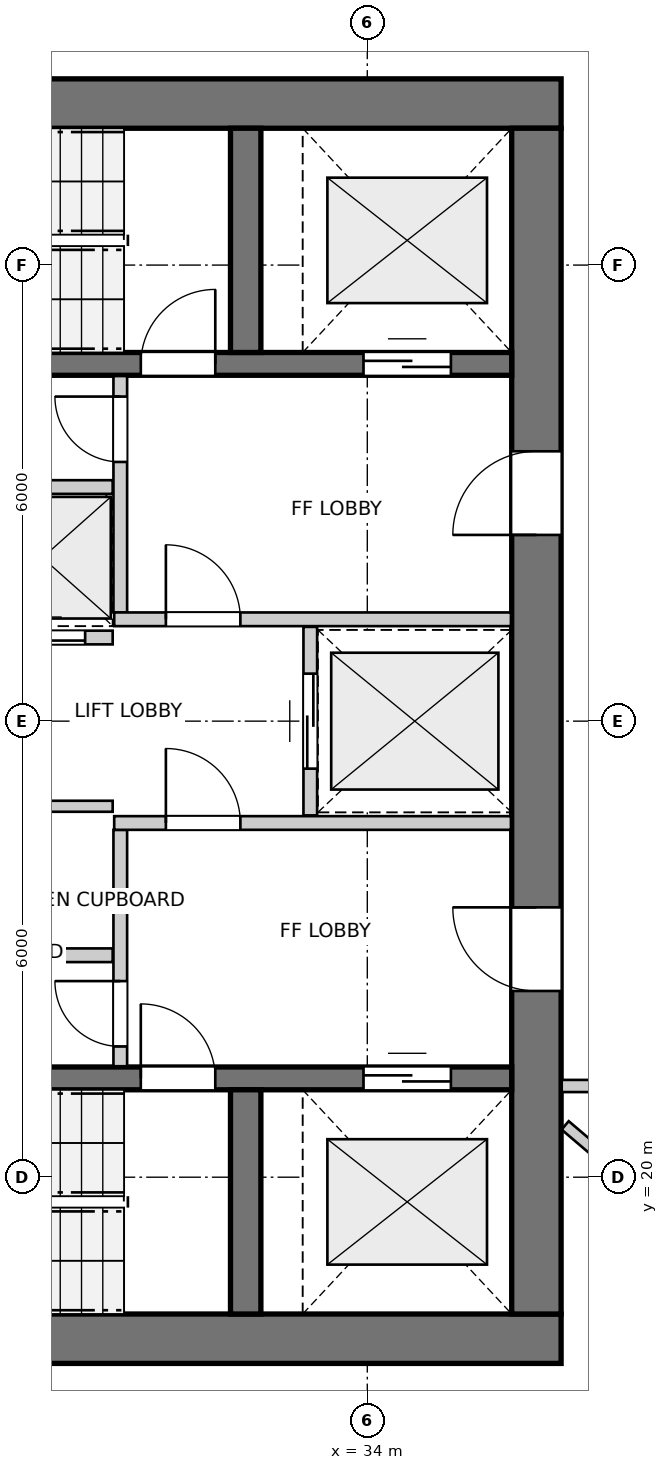
"""IFC4 building model, lengths in metres.
Left out: names, types, materials, properties, quantities, classifications, styles, units other than length and angle.
Written with IfcOpenShell. Run it as: python <this file> out.ifc"""

import sys

from ifc_helpers import new_model, si_unit, direction, frame, frame_2d, origin, place, context, subcontext, project, spatial, rectangle, extrude, source, transform, mapped, element, fill, save


model = new_model("IFC4")
c1 = context("Model", 3, precision=1e-05, world=origin(), true_north=direction((0.0, 1.0)))
c2 = subcontext(c1, "Body", "Model", "MODEL_VIEW")
j1 = project(units=[si_unit("LENGTHUNIT", "METRE"), si_unit("PLANEANGLEUNIT", "RADIAN")], contexts=[c1])
p1 = place(None, origin())
s1 = spatial("IfcSite", under=j1, at=p1, CompositionType="ELEMENT")
p2 = place(p1, origin())
s2 = spatial("IfcBuilding", under=s1, at=p2, CompositionType="ELEMENT")
p3 = place(p2, frame((0.0, 0.0, 165.0)))
s3 = spatial("IfcBuildingStorey", under=s2, at=p3, CompositionType="ELEMENT", Elevation=165.0)
for number, where, z_axis, x_axis in (
    (1, (24.15, 17.875, 0.0), (0.0, 0.0, 1.0), (1.0, 0.0, 0.0)),
    (2, (36.55, 34.125, 0.0), (0.0, 0.0, 1.0), (-1.0, 0.0, 0.0)),
):
    element("IfcWall", number, at=place(p3, frame(where, z_axis=z_axis, x_axis=x_axis)), inside=s3, PredefinedType="SHEAR", context=c2, shape_type="SweptSolid", body=[
        extrude(rectangle(XDim=12.4, YDim=0.65, at=frame_2d((6.2, 0.0))), origin(), (0.0, 0.0, 1.0), 2.95),
    ])
p4 = place(p3, frame((36.225, 18.2, 0.0), z_axis=(0.0, 0.0, 1.0), x_axis=(0.0, 1.0, 0.0)))
e3 = element("IfcWall", 3, at=p4, inside=s3, PredefinedType="SHEAR", context=c2, shape_type="SweptSolid", body=[
    extrude(rectangle(XDim=15.6, YDim=0.65, at=frame_2d((7.8, 0.0))), origin(), (0.0, 0.0, 1.0), 2.95),
])
p5 = place(p4, frame((4.25, 0.0, 0.0)))
e4 = element("IfcOpeningElement", 4, at=p5, cuts=e3, PredefinedType="OPENING", context=c2, shape_type="SweptSolid", body=[
    extrude(rectangle(XDim=1.1, YDim=2.15, at=frame_2d((0.55, 1.075))), frame((0.0, 0.335, 0.0), z_axis=(0.0, -1.0, 0.0), x_axis=(1.0, 0.0, 0.0)), (0.0, 0.0, 1.0), 0.67),
])
p6 = place(p4, frame((10.25, 0.0, 0.0)))
e5 = element("IfcOpeningElement", 5, at=p6, cuts=e3, PredefinedType="OPENING", context=c2, shape_type="SweptSolid", body=[
    extrude(rectangle(XDim=1.1, YDim=2.15, at=frame_2d((0.55, 1.075))), frame((0.0, 0.335, 0.0), z_axis=(0.0, -1.0, 0.0), x_axis=(1.0, 0.0, 0.0)), (0.0, 0.0, 1.0), 0.67),
])
p7 = place(p3, frame((24.8, 21.3, 0.0), z_axis=(0.0, 0.0, 1.0), x_axis=(1.0, 0.0, 0.0)))
e6 = element("IfcWall", 6, at=p7, inside=s3, PredefinedType="SHEAR", context=c2, shape_type="SweptSolid", body=[
    extrude(rectangle(XDim=11.1, YDim=0.3, at=frame_2d((5.55, 0.0))), origin(), (0.0, 0.0, 1.0), 2.95),
])
p8 = place(p7, frame((6.22, 0.0, 0.0)))
e7 = element("IfcOpeningElement", 7, at=p8, cuts=e6, PredefinedType="OPENING", context=c2, shape_type="SweptSolid", body=[
    extrude(rectangle(XDim=0.98, YDim=2.15, at=frame_2d((0.49, 1.075))), frame((0.0, 0.16, 0.0), z_axis=(0.0, -1.0, 0.0), x_axis=(1.0, 0.0, 0.0)), (0.0, 0.0, 1.0), 0.32),
])
p9 = place(p7, frame((9.15, 0.0, 0.0)))
e8 = element("IfcOpeningElement", 8, at=p9, cuts=e6, PredefinedType="OPENING", context=c2, shape_type="SweptSolid", body=[
    extrude(rectangle(XDim=1.15, YDim=2.15, at=frame_2d((0.575, 1.075))), frame((0.0, 0.16, 0.0), z_axis=(0.0, -1.0, 0.0), x_axis=(1.0, 0.0, 0.0)), (0.0, 0.0, 1.0), 0.32),
])
p10 = place(p3, frame((32.4, 18.2, 0.0), z_axis=(0.0, 0.0, 1.0), x_axis=(0.0, 1.0, 0.0)))
e9 = element("IfcWall", 9, at=p10, inside=s3, PredefinedType="SHEAR", context=c2, shape_type="SweptSolid", body=[
    extrude(rectangle(XDim=2.95, YDim=0.4, at=frame_2d((1.475, 0.0))), origin(), (0.0, 0.0, 1.0), 2.95),
])
p11 = place(p3, frame((24.8, 30.7, 0.0), z_axis=(0.0, 0.0, 1.0), x_axis=(1.0, 0.0, 0.0)))
e10 = element("IfcWall", 10, at=p11, inside=s3, PredefinedType="SHEAR", context=c2, shape_type="SweptSolid", body=[
    extrude(rectangle(XDim=11.1, YDim=0.3, at=frame_2d((5.55, 0.0))), origin(), (0.0, 0.0, 1.0), 2.95),
])
p12 = place(p11, frame((6.22, 0.0, 0.0)))
e11 = element("IfcOpeningElement", 11, at=p12, cuts=e10, PredefinedType="OPENING", context=c2, shape_type="SweptSolid", body=[
    extrude(rectangle(XDim=0.98, YDim=2.15, at=frame_2d((0.49, 1.075))), frame((0.0, 0.16, 0.0), z_axis=(0.0, -1.0, 0.0), x_axis=(1.0, 0.0, 0.0)), (0.0, 0.0, 1.0), 0.32),
])
p13 = place(p11, frame((9.15, 0.0, 0.0)))
e12 = element("IfcOpeningElement", 12, at=p13, cuts=e10, PredefinedType="OPENING", context=c2, shape_type="SweptSolid", body=[
    extrude(rectangle(XDim=1.15, YDim=2.15, at=frame_2d((0.575, 1.075))), frame((0.0, 0.16, 0.0), z_axis=(0.0, -1.0, 0.0), x_axis=(1.0, 0.0, 0.0)), (0.0, 0.0, 1.0), 0.32),
])
p14 = place(p3, frame((32.4, 30.85, 0.0), z_axis=(0.0, 0.0, 1.0), x_axis=(0.0, 1.0, 0.0)))
e13 = element("IfcWall", 13, at=p14, inside=s3, PredefinedType="SHEAR", context=c2, shape_type="SweptSolid", body=[
    extrude(rectangle(XDim=2.95, YDim=0.4, at=frame_2d((1.475, 0.0))), origin(), (0.0, 0.0, 1.0), 2.95),
])
p15 = place(p3, frame((30.75, 21.46, 0.0), z_axis=(0.0, 0.0, 1.0), x_axis=(0.0, 1.0, 0.0)))
e14 = element("IfcWall", 14, at=p15, inside=s3, PredefinedType="PARTITIONING", context=c2, shape_type="SweptSolid", body=[
    extrude(rectangle(XDim=3.11, YDim=0.18, at=frame_2d((1.555, 0.0))), origin(), (0.0, 0.0, 1.0), 2.95),
])
p16 = place(p15, frame((0.26, 0.0, 0.0)))
e15 = element("IfcOpeningElement", 15, at=p16, cuts=e14, PredefinedType="OPENING", context=c2, shape_type="SweptSolid", body=[
    extrude(rectangle(XDim=0.86, YDim=2.05, at=frame_2d((0.43, 1.025))), frame((0.0, 0.1, 0.0), z_axis=(0.0, -1.0, 0.0), x_axis=(1.0, 0.0, 0.0)), (0.0, 0.0, 1.0), 0.2),
])
p17 = place(p3, frame((30.67, 24.66, 0.0), z_axis=(0.0, 0.0, 1.0), x_axis=(1.0, 0.0, 0.0)))
e16 = element("IfcWall", 16, at=p17, inside=s3, PredefinedType="PARTITIONING", context=c2, shape_type="SweptSolid", body=[
    extrude(rectangle(XDim=5.22, YDim=0.18, at=frame_2d((2.61, 0.0))), origin(), (0.0, 0.0, 1.0), 2.95),
])
p18 = place(p17, frame((0.68, 0.0, 0.0)))
e17 = element("IfcOpeningElement", 17, at=p18, cuts=e16, PredefinedType="OPENING", context=c2, shape_type="SweptSolid", body=[
    extrude(rectangle(XDim=0.98, YDim=2.15, at=frame_2d((0.49, 1.075))), frame((0.0, 0.1, 0.0), z_axis=(0.0, -1.0, 0.0), x_axis=(1.0, 0.0, 0.0)), (0.0, 0.0, 1.0), 0.2),
])
p19 = place(p3, frame((30.75, 27.43, 0.0), z_axis=(0.0, 0.0, 1.0), x_axis=(0.0, 1.0, 0.0)))
e18 = element("IfcWall", 18, at=p19, inside=s3, PredefinedType="PARTITIONING", context=c2, shape_type="SweptSolid", body=[
    extrude(rectangle(XDim=3.11, YDim=0.18, at=frame_2d((1.555, 0.0))), origin(), (0.0, 0.0, 1.0), 2.95),
])
p20 = place(p19, frame((1.98, 0.0, 0.0)))
e19 = element("IfcOpeningElement", 19, at=p20, cuts=e18, PredefinedType="OPENING", context=c2, shape_type="SweptSolid", body=[
    extrude(rectangle(XDim=0.86, YDim=2.05, at=frame_2d((0.43, 1.025))), frame((0.0, 0.1, 0.0), z_axis=(0.0, -1.0, 0.0), x_axis=(1.0, 0.0, 0.0)), (0.0, 0.0, 1.0), 0.2),
])
p21 = place(p3, frame((30.67, 27.34, 0.0), z_axis=(0.0, 0.0, 1.0), x_axis=(1.0, 0.0, 0.0)))
e20 = element("IfcWall", 20, at=p21, inside=s3, PredefinedType="PARTITIONING", context=c2, shape_type="SweptSolid", body=[
    extrude(rectangle(XDim=5.22, YDim=0.18, at=frame_2d((2.61, 0.0))), origin(), (0.0, 0.0, 1.0), 2.95),
])
p22 = place(p21, frame((0.68, 0.0, 0.0)))
e21 = element("IfcOpeningElement", 21, at=p22, cuts=e20, PredefinedType="OPENING", context=c2, shape_type="SweptSolid", body=[
    extrude(rectangle(XDim=0.98, YDim=2.15, at=frame_2d((0.49, 1.075))), frame((0.0, 0.1, 0.0), z_axis=(0.0, -1.0, 0.0), x_axis=(1.0, 0.0, 0.0)), (0.0, 0.0, 1.0), 0.2),
])
p23 = place(p3, frame((33.25, 24.76, 0.0), z_axis=(0.0, 0.0, 1.0), x_axis=(0.0, 1.0, 0.0)))
e22 = element("IfcWall", 22, at=p23, inside=s3, PredefinedType="PARTITIONING", context=c2, shape_type="SweptSolid", body=[
    extrude(rectangle(XDim=2.48, YDim=0.18, at=frame_2d((1.24, 0.0))), origin(), (0.0, 0.0, 1.0), 2.95),
])
p24 = place(p23, frame((0.615, 0.0, 0.0)))
e23 = element("IfcOpeningElement", 23, at=p24, cuts=e22, PredefinedType="OPENING", context=c2, shape_type="SweptSolid", body=[
    extrude(rectangle(XDim=1.25, YDim=2.15, at=frame_2d((0.625, 1.075))), frame((0.0, 0.1, 0.0), z_axis=(0.0, -1.0, 0.0), x_axis=(1.0, 0.0, 0.0)), (0.0, 0.0, 1.0), 0.2),
])
p25 = place(p3, frame((24.81, 22.92, 0.0), z_axis=(0.0, 0.0, 1.0), x_axis=(1.0, 0.0, 0.0)))
e24 = element("IfcWall", 24, at=p25, inside=s3, PredefinedType="PARTITIONING", context=c2, shape_type="SweptSolid", body=[
    extrude(rectangle(XDim=5.84, YDim=0.18, at=frame_2d((2.92, 0.0))), origin(), (0.0, 0.0, 1.0), 2.95),
])
p26 = place(p3, frame((28.13, 24.88, 0.0), z_axis=(0.0, 0.0, 1.0), x_axis=(1.0, 0.0, 0.0)))
e25 = element("IfcWall", 25, at=p26, inside=s3, PredefinedType="PARTITIONING", context=c2, shape_type="SweptSolid", body=[
    extrude(rectangle(XDim=2.52, YDim=0.145, at=frame_2d((1.26, 0.0))), origin(), (0.0, 0.0, 1.0), 2.95),
])
p27 = place(p26, frame((0.82, 0.0, 0.0)))
e26 = element("IfcOpeningElement", 26, at=p27, cuts=e25, PredefinedType="OPENING", context=c2, shape_type="SweptSolid", body=[
    extrude(rectangle(XDim=0.86, YDim=2.05, at=frame_2d((0.43, 1.025))), frame((0.0, 0.083, 0.0), z_axis=(0.0, -1.0, 0.0), x_axis=(1.0, 0.0, 0.0)), (0.0, 0.0, 1.0), 0.165),
])
p28 = place(p3, frame((24.81, 29.08, 0.0), z_axis=(0.0, 0.0, 1.0), x_axis=(1.0, 0.0, 0.0)))
e27 = element("IfcWall", 27, at=p28, inside=s3, PredefinedType="PARTITIONING", context=c2, shape_type="SweptSolid", body=[
    extrude(rectangle(XDim=5.84, YDim=0.18, at=frame_2d((2.92, 0.0))), origin(), (0.0, 0.0, 1.0), 2.95),
])
p29 = place(p3, frame((28.825, 27.1, 0.0), z_axis=(0.0, 0.0, 1.0), x_axis=(1.0, 0.0, 0.0)))
e28 = element("IfcWall", 28, at=p29, inside=s3, PredefinedType="PARTITIONING", context=c2, shape_type="SweptSolid", body=[
    extrude(rectangle(XDim=1.825, YDim=0.18, at=frame_2d((0.913, 0.0))), origin(), (0.0, 0.0, 1.0), 2.95),
])
p30 = place(p29, frame((0.363, 0.0, 0.0)))
e29 = element("IfcOpeningElement", 29, at=p30, cuts=e28, PredefinedType="OPENING", context=c2, shape_type="SweptSolid", body=[
    extrude(rectangle(XDim=1.1, YDim=2.15, at=frame_2d((0.55, 1.075))), frame((0.0, 0.1, 0.0), z_axis=(0.0, -1.0, 0.0), x_axis=(1.0, 0.0, 0.0)), (0.0, 0.0, 1.0), 0.2),
])
p31 = place(p3, frame((36.603, 20.682, 0.0), z_axis=(0.0, 0.0, 1.0), x_axis=(0.761710074833, -0.647918020971, 0.0)))
e30 = element("IfcWall", 30, at=p31, inside=s3, PredefinedType="PARTITIONING", context=c2, shape_type="SweptSolid", body=[
    extrude(rectangle(XDim=7.359, YDim=0.145, at=frame_2d((3.68, 0.0))), origin(), (0.0, 0.0, 1.0), 2.95),
])
p32 = place(p3, frame((36.558, 21.2, 0.0), z_axis=(0.0, 0.0, 1.0), x_axis=(1.0, 0.0, 0.0)))
e31 = element("IfcWall", 31, at=p32, inside=s3, PredefinedType="PARTITIONING", context=c2, shape_type="SweptSolid", body=[
    extrude(rectangle(XDim=1.684, YDim=0.16, at=frame_2d((0.842, 0.0))), origin(), (0.0, 0.0, 1.0), 2.95),
])
m1 = source(origin(), c2, "Body", "SweptSolid", [
    extrude(rectangle(XDim=0.98, YDim=2.15, at=frame_2d((0.49, 1.075))), frame((0.0, 0.025, 0.0), z_axis=(0.0, -1.0, 0.0), x_axis=(1.0, 0.0, 0.0)), (0.0, 0.0, 1.0), 0.05),
])
p33 = place(p8, origin())
e32 = element("IfcDoor", 32, at=p33, inside=s3, OperationType="SINGLE_SWING_LEFT", PredefinedType="DOOR", context=c2, shape_type="MappedRepresentation", body=[
    mapped(m1, transform((0.0, 0.0, 0.0), x_axis=(1.0, 0.0, 0.0), y_axis=(0.0, 1.0, 0.0), z_axis=(0.0, 0.0, 1.0), scale=1.0)),
])
fill(e7, e32)
m2 = source(origin(), c2, "Body", "SweptSolid", [
    extrude(rectangle(XDim=1.15, YDim=2.15, at=frame_2d((0.575, 1.075))), frame((0.0, 0.025, 0.0), z_axis=(0.0, -1.0, 0.0), x_axis=(1.0, 0.0, 0.0)), (0.0, 0.0, 1.0), 0.05),
])
p34 = place(p9, origin())
e33 = element("IfcDoor", 33, at=p34, inside=s3, OperationType="DOUBLE_DOOR_SLIDING", PredefinedType="DOOR", context=c2, shape_type="MappedRepresentation", body=[
    mapped(m2, transform((0.0, 0.0, 0.0), x_axis=(1.0, 0.0, 0.0), y_axis=(0.0, 1.0, 0.0), z_axis=(0.0, 0.0, 1.0), scale=1.0)),
])
fill(e8, e33)
p35 = place(p12, origin())
e34 = element("IfcDoor", 34, at=p35, inside=s3, OperationType="SINGLE_SWING_RIGHT", PredefinedType="DOOR", context=c2, shape_type="MappedRepresentation", body=[
    mapped(m1, transform((0.0, 0.0, 0.0), x_axis=(1.0, 0.0, 0.0), y_axis=(0.0, 1.0, 0.0), z_axis=(0.0, 0.0, 1.0), scale=1.0)),
])
fill(e11, e34)
p36 = place(p13, origin())
e35 = element("IfcDoor", 35, at=p36, inside=s3, OperationType="DOUBLE_DOOR_SLIDING", PredefinedType="DOOR", context=c2, shape_type="MappedRepresentation", body=[
    mapped(m2, transform((0.0, 0.0, 0.0), x_axis=(1.0, 0.0, 0.0), y_axis=(0.0, 1.0, 0.0), z_axis=(0.0, 0.0, 1.0), scale=1.0)),
])
fill(e12, e35)
m3 = source(origin(), c2, "Body", "SweptSolid", [
    extrude(rectangle(XDim=1.1, YDim=2.15, at=frame_2d((0.55, 1.075))), frame((0.0, 0.025, 0.0), z_axis=(0.0, -1.0, 0.0), x_axis=(1.0, 0.0, 0.0)), (0.0, 0.0, 1.0), 0.05),
])
p37 = place(p5, origin())
e36 = element("IfcDoor", 36, at=p37, inside=s3, OperationType="SINGLE_SWING_RIGHT", PredefinedType="DOOR", context=c2, shape_type="MappedRepresentation", body=[
    mapped(m3, transform((0.0, 0.0, 0.0), x_axis=(1.0, 0.0, 0.0), y_axis=(0.0, 1.0, 0.0), z_axis=(0.0, 0.0, 1.0), scale=1.0)),
])
fill(e4, e36)
p38 = place(p6, origin())
e37 = element("IfcDoor", 37, at=p38, inside=s3, OperationType="SINGLE_SWING_LEFT", PredefinedType="DOOR", context=c2, shape_type="MappedRepresentation", body=[
    mapped(m3, transform((0.0, 0.0, 0.0), x_axis=(1.0, 0.0, 0.0), y_axis=(0.0, 1.0, 0.0), z_axis=(0.0, 0.0, 1.0), scale=1.0)),
])
fill(e5, e37)
m4 = source(origin(), c2, "Body", "SweptSolid", [
    extrude(rectangle(XDim=0.86, YDim=2.05, at=frame_2d((0.43, 1.025))), frame((0.0, 0.025, 0.0), z_axis=(0.0, -1.0, 0.0), x_axis=(1.0, 0.0, 0.0)), (0.0, 0.0, 1.0), 0.05),
])
p39 = place(p16, origin())
e38 = element("IfcDoor", 38, at=p39, inside=s3, OperationType="SINGLE_SWING_RIGHT", PredefinedType="DOOR", context=c2, shape_type="MappedRepresentation", body=[
    mapped(m4, transform((0.0, 0.0, 0.0), x_axis=(1.0, 0.0, 0.0), y_axis=(0.0, 1.0, 0.0), z_axis=(0.0, 0.0, 1.0), scale=1.0)),
])
fill(e15, e38)
p40 = place(p18, origin())
e39 = element("IfcDoor", 39, at=p40, inside=s3, OperationType="SINGLE_SWING_LEFT", PredefinedType="DOOR", context=c2, shape_type="MappedRepresentation", body=[
    mapped(m1, transform((0.0, 0.0, 0.0), x_axis=(1.0, 0.0, 0.0), y_axis=(0.0, 1.0, 0.0), z_axis=(0.0, 0.0, 1.0), scale=1.0)),
])
fill(e17, e39)
p41 = place(p20, origin())
e40 = element("IfcDoor", 40, at=p41, inside=s3, OperationType="SINGLE_SWING_RIGHT", PredefinedType="DOOR", context=c2, shape_type="MappedRepresentation", body=[
    mapped(m4, transform((0.0, 0.0, 0.0), x_axis=(1.0, 0.0, 0.0), y_axis=(0.0, 1.0, 0.0), z_axis=(0.0, 0.0, 1.0), scale=1.0)),
])
fill(e19, e40)
p42 = place(p22, origin())
e41 = element("IfcDoor", 41, at=p42, inside=s3, OperationType="SINGLE_SWING_LEFT", PredefinedType="DOOR", context=c2, shape_type="MappedRepresentation", body=[
    mapped(m1, transform((0.0, 0.0, 0.0), x_axis=(1.0, 0.0, 0.0), y_axis=(0.0, 1.0, 0.0), z_axis=(0.0, 0.0, 1.0), scale=1.0)),
])
fill(e21, e41)
m5 = source(origin(), c2, "Body", "SweptSolid", [
    extrude(rectangle(XDim=1.25, YDim=2.15, at=frame_2d((0.625, 1.075))), frame((0.0, 0.025, 0.0), z_axis=(0.0, -1.0, 0.0), x_axis=(1.0, 0.0, 0.0)), (0.0, 0.0, 1.0), 0.05),
])
p43 = place(p24, origin())
e42 = element("IfcDoor", 42, at=p43, inside=s3, OperationType="DOUBLE_DOOR_SLIDING", PredefinedType="DOOR", context=c2, shape_type="MappedRepresentation", body=[
    mapped(m5, transform((0.0, 0.0, 0.0), x_axis=(1.0, 0.0, 0.0), y_axis=(0.0, 1.0, 0.0), z_axis=(0.0, 0.0, 1.0), scale=1.0)),
])
fill(e23, e42)
p44 = place(p30, origin())
e43 = element("IfcDoor", 43, at=p44, inside=s3, OperationType="DOUBLE_DOOR_SLIDING", PredefinedType="DOOR", context=c2, shape_type="MappedRepresentation", body=[
    mapped(m3, transform((0.0, 0.0, 0.0), x_axis=(1.0, 0.0, 0.0), y_axis=(0.0, 1.0, 0.0), z_axis=(0.0, 0.0, 1.0), scale=1.0)),
])
fill(e29, e43)
save(model, sys.argv[1])
